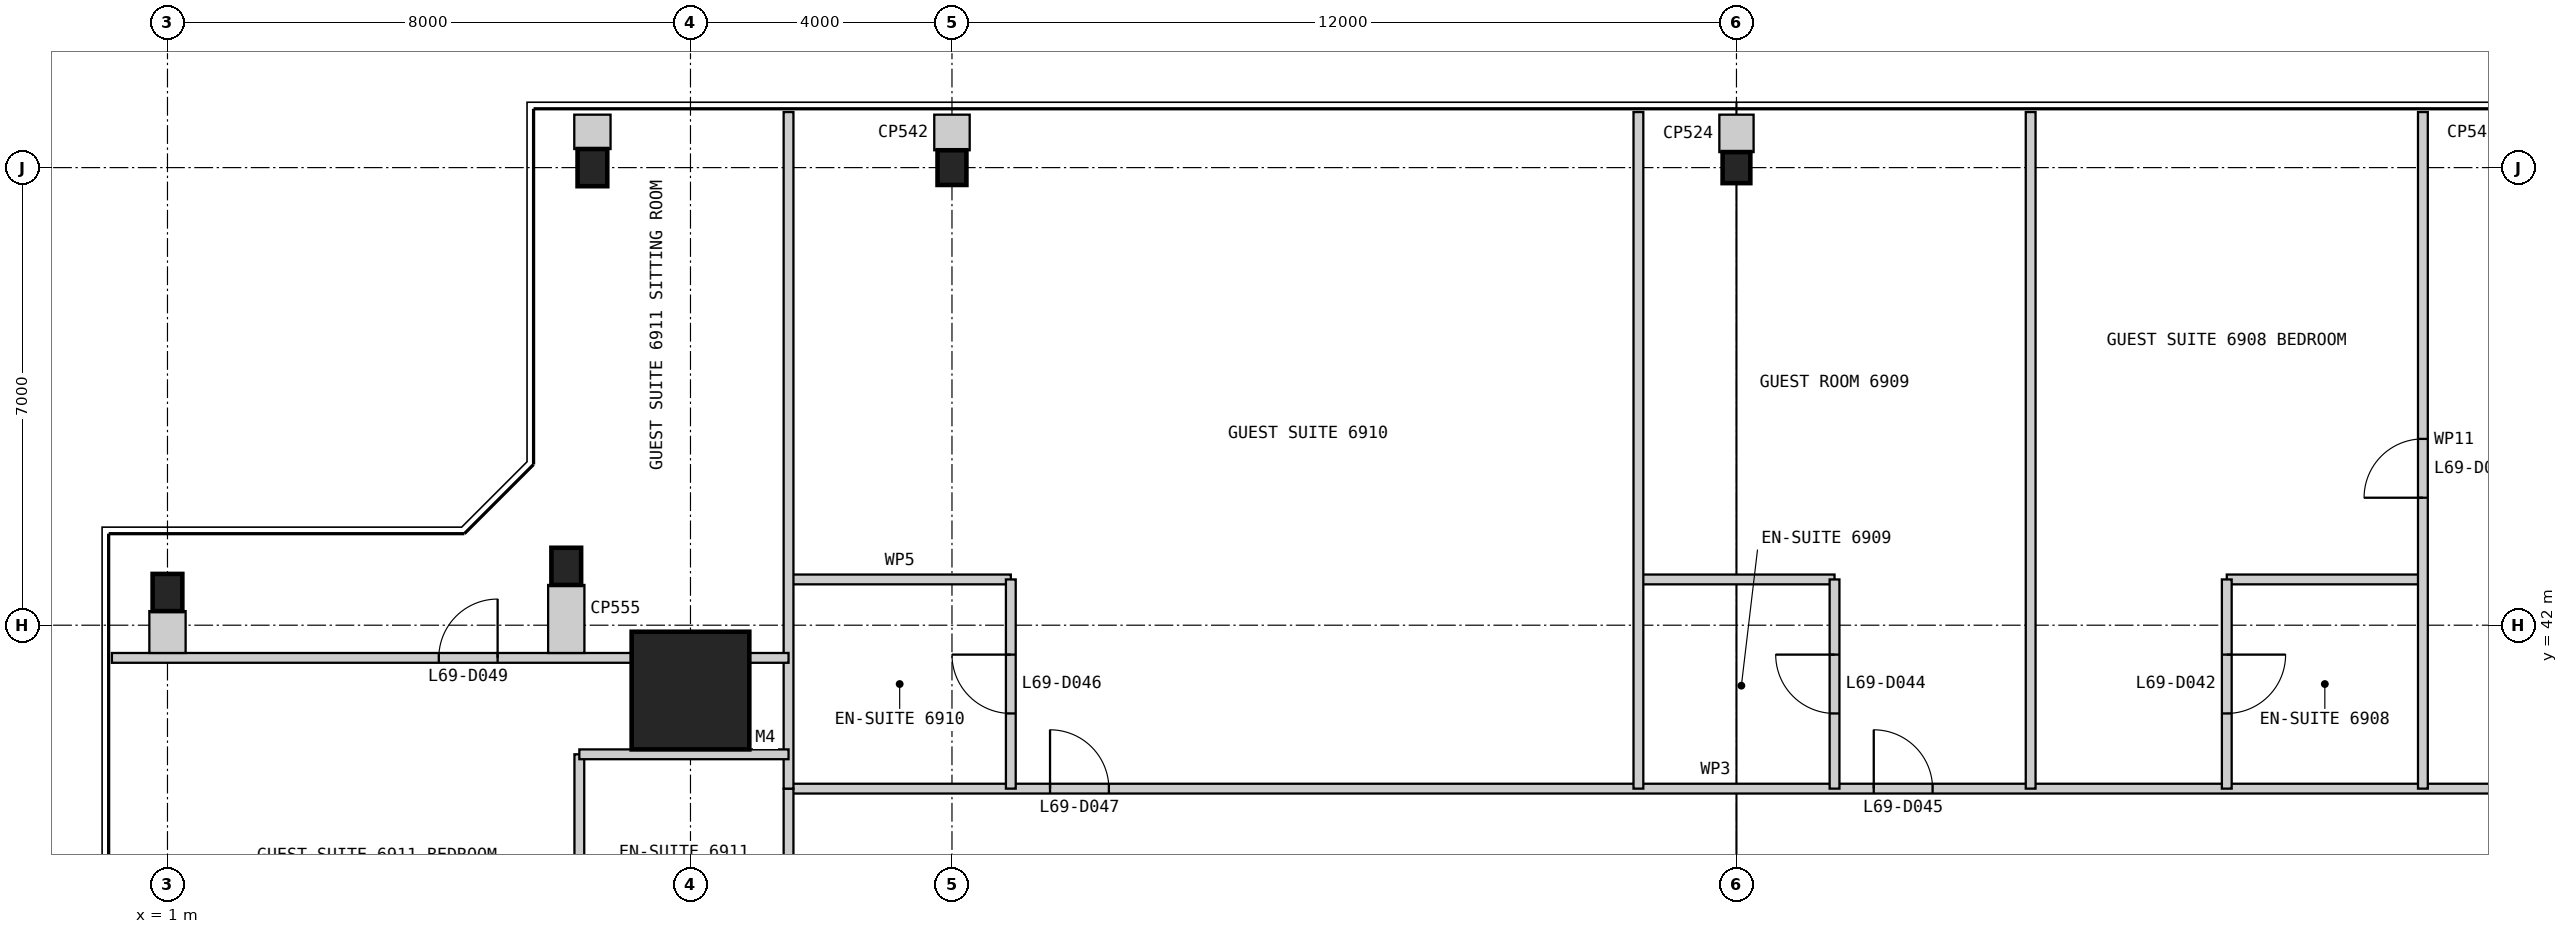
"""IFC4 building model, lengths in metres.
Left out: names, types, materials, properties, quantities, classifications, styles, units other than length and angle.
Written with IfcOpenShell. Run it as: python <this file> out.ifc"""

import sys

from ifc_helpers import new_model, si_unit, direction, frame, frame_2d, origin, origin_2d, place, context, subcontext, project, spatial, rectangle, i_section, extrude, element, fill, save


model = new_model("IFC4")
c1 = context("Model", 3, precision=1e-05, world=origin(), true_north=direction((0.0, 1.0)))
c2 = subcontext(c1, "Body", "Model", "MODEL_VIEW")
j1 = project(units=[si_unit("LENGTHUNIT", "METRE"), si_unit("PLANEANGLEUNIT", "RADIAN")], contexts=[c1])
p1 = place(None, origin())
s1 = spatial("IfcSite", under=j1, at=p1, CompositionType="ELEMENT")
p2 = place(p1, origin())
s2 = spatial("IfcBuilding", under=s1, at=p2, CompositionType="ELEMENT")
p3 = place(p2, frame((0.0, 0.0, 286.6)))
s3 = spatial("IfcBuildingStorey", under=s2, at=p3, CompositionType="ELEMENT", Elevation=286.6)
p4 = place(p3, frame((9.0, 41.0, 0.0), z_axis=(0.0, 0.0, 1.0), x_axis=(1.0, 0.0, 0.0)))
e1 = element("IfcColumn", 1, at=p4, inside=s3, PredefinedType="COLUMN", context=c2, shape_type="SweptSolid", body=[
    extrude(rectangle(XDim=1.8, YDim=1.8, at=origin_2d()), origin(), (0.0, 0.0, 1.0), 3.4),
])
p5 = place(p3, frame((25.0, 49.0, 0.0), z_axis=(0.0, 0.0, 1.0), x_axis=(1.0, 0.0, 0.0)))
e2 = element("IfcColumn", 2, at=p5, inside=s3, PredefinedType="COLUMN", context=c2, shape_type="SweptSolid", body=[
    extrude(i_section(OverallWidth=0.424, OverallDepth=0.475, WebThickness=0.048, FlangeThickness=0.077, at=origin_2d()), origin(), (0.0, 0.0, 1.0), 3.4),
])
p6 = place(p3, frame((13.0, 49.0, 0.0), z_axis=(0.0, 0.0, 1.0), x_axis=(1.0, 0.0, 0.0)))
e3 = element("IfcColumn", 3, at=p6, inside=s3, PredefinedType="COLUMN", context=c2, shape_type="SweptSolid", body=[
    extrude(i_section(OverallWidth=0.442, OverallDepth=0.531, WebThickness=0.066, FlangeThickness=0.106, at=origin_2d()), origin(), (0.0, 0.0, 1.0), 3.4),
])
for number, where, z_axis, x_axis in (
    (4, (7.5, 49.0, 0.0), (0.0, 0.0, 1.0), (1.0, 0.0, 0.0)),
    (5, (7.1, 42.9, 0.0), (0.0, 0.0, 1.0), (1.0, 0.0, 0.0)),
    (6, (1.0, 42.5, 0.0), (0.0, 0.0, 1.0), (1.0, 0.0, 0.0)),
):
    element("IfcColumn", number, at=place(p3, frame(where, z_axis=z_axis, x_axis=x_axis)), inside=s3, PredefinedType="COLUMN", context=c2, shape_type="SweptSolid", body=[
        extrude(i_section(OverallWidth=0.455, OverallDepth=0.569, WebThickness=0.078, FlangeThickness=0.125, at=origin_2d()), origin(), (0.0, 0.0, 1.0), 3.4),
    ])
p7 = place(p3, frame((39.5, 39.5, 0.0), z_axis=(0.0, 0.0, 1.0), x_axis=(-1.0, 0.0, 0.0)))
e7 = element("IfcWall", 7, at=p7, inside=s3, PredefinedType="PARTITIONING", context=c2, shape_type="SweptSolid", body=[
    extrude(rectangle(XDim=29.0, YDim=0.15, at=frame_2d((14.5, 0.0))), origin(), (0.0, 0.0, 1.0), 3.25),
])
p8 = place(p7, frame((1.85, 0.0, 0.0)))
e8 = element("IfcOpeningElement", 8, at=p8, cuts=e7, PredefinedType="OPENING", context=c2, shape_type="SweptSolid", body=[
    extrude(rectangle(XDim=0.9, YDim=2.1, at=frame_2d((0.45, 1.05))), frame((0.0, 0.085, 0.0), z_axis=(0.0, -1.0, 0.0), x_axis=(1.0, 0.0, 0.0)), (0.0, 0.0, 1.0), 0.17),
])
p9 = place(p7, frame((11.5, 0.0, 0.0)))
e9 = element("IfcOpeningElement", 9, at=p9, cuts=e7, PredefinedType="OPENING", context=c2, shape_type="SweptSolid", body=[
    extrude(rectangle(XDim=0.9, YDim=2.1, at=frame_2d((0.45, 1.05))), frame((0.0, 0.085, 0.0), z_axis=(0.0, -1.0, 0.0), x_axis=(1.0, 0.0, 0.0)), (0.0, 0.0, 1.0), 0.17),
])
p10 = place(p7, frame((24.1, 0.0, 0.0)))
e10 = element("IfcOpeningElement", 10, at=p10, cuts=e7, PredefinedType="OPENING", context=c2, shape_type="SweptSolid", body=[
    extrude(rectangle(XDim=0.9, YDim=2.1, at=frame_2d((0.45, 1.05))), frame((0.0, 0.085, 0.0), z_axis=(0.0, -1.0, 0.0), x_axis=(1.0, 0.0, 0.0)), (0.0, 0.0, 1.0), 0.17),
])
p11 = place(p3, frame((35.5, 42.7, 0.0), z_axis=(0.0, 0.0, 1.0), x_axis=(-1.0, 0.0, 0.0)))
e11 = element("IfcWall", 11, at=p11, inside=s3, PredefinedType="PARTITIONING", context=c2, shape_type="SweptSolid", body=[
    extrude(rectangle(XDim=3.0, YDim=0.15, at=frame_2d((1.5, 0.0))), origin(), (0.0, 0.0, 1.0), 3.25),
])
p12 = place(p3, frame((32.5, 42.7, 0.0), z_axis=(0.0, 0.0, 1.0), x_axis=(0.0, -1.0, 0.0)))
e12 = element("IfcWall", 12, at=p12, inside=s3, PredefinedType="PARTITIONING", context=c2, shape_type="SweptSolid", body=[
    extrude(rectangle(XDim=3.2, YDim=0.15, at=frame_2d((1.6, 0.0))), origin(), (0.0, 0.0, 1.0), 3.25),
])
p13 = place(p12, frame((1.15, 0.0, 0.0)))
e13 = element("IfcOpeningElement", 13, at=p13, cuts=e12, PredefinedType="OPENING", context=c2, shape_type="SweptSolid", body=[
    extrude(rectangle(XDim=0.9, YDim=2.1, at=frame_2d((0.45, 1.05))), frame((0.0, 0.085, 0.0), z_axis=(0.0, -1.0, 0.0), x_axis=(1.0, 0.0, 0.0)), (0.0, 0.0, 1.0), 0.17),
])
p14 = place(p3, frame((35.5, 49.85, 0.0), z_axis=(0.0, 0.0, 1.0), x_axis=(0.0, -1.0, 0.0)))
e14 = element("IfcWall", 14, at=p14, inside=s3, PredefinedType="PARTITIONING", context=c2, shape_type="SweptSolid", body=[
    extrude(rectangle(XDim=10.35, YDim=0.15, at=frame_2d((5.175, 0.0))), origin(), (0.0, 0.0, 1.0), 3.25),
])
p15 = place(p14, frame((5.0, 0.0, 0.0)))
e15 = element("IfcOpeningElement", 15, at=p15, cuts=e14, PredefinedType="OPENING", context=c2, shape_type="SweptSolid", body=[
    extrude(rectangle(XDim=0.9, YDim=2.1, at=frame_2d((0.45, 1.05))), frame((0.0, 0.085, 0.0), z_axis=(0.0, -1.0, 0.0), x_axis=(1.0, 0.0, 0.0)), (0.0, 0.0, 1.0), 0.17),
])
p16 = place(p3, frame((29.5, 49.85, 0.0), z_axis=(0.0, 0.0, 1.0), x_axis=(0.0, -1.0, 0.0)))
e16 = element("IfcWall", 16, at=p16, inside=s3, PredefinedType="PARTITIONING", context=c2, shape_type="SweptSolid", body=[
    extrude(rectangle(XDim=10.35, YDim=0.15, at=frame_2d((5.175, 0.0))), origin(), (0.0, 0.0, 1.0), 3.25),
])
p17 = place(p3, frame((26.5, 42.7, 0.0), z_axis=(0.0, 0.0, 1.0), x_axis=(-1.0, 0.0, 0.0)))
e17 = element("IfcWall", 17, at=p17, inside=s3, PredefinedType="PARTITIONING", context=c2, shape_type="SweptSolid", body=[
    extrude(rectangle(XDim=3.0, YDim=0.15, at=frame_2d((1.5, 0.0))), origin(), (0.0, 0.0, 1.0), 3.25),
])
p18 = place(p3, frame((26.5, 42.7, 0.0), z_axis=(0.0, 0.0, 1.0), x_axis=(0.0, -1.0, 0.0)))
e18 = element("IfcWall", 18, at=p18, inside=s3, PredefinedType="PARTITIONING", context=c2, shape_type="SweptSolid", body=[
    extrude(rectangle(XDim=3.2, YDim=0.15, at=frame_2d((1.6, 0.0))), origin(), (0.0, 0.0, 1.0), 3.25),
])
p19 = place(p18, frame((1.15, 0.0, 0.0)))
e19 = element("IfcOpeningElement", 19, at=p19, cuts=e18, PredefinedType="OPENING", context=c2, shape_type="SweptSolid", body=[
    extrude(rectangle(XDim=0.9, YDim=2.1, at=frame_2d((0.45, 1.05))), frame((0.0, 0.085, 0.0), z_axis=(0.0, -1.0, 0.0), x_axis=(1.0, 0.0, 0.0)), (0.0, 0.0, 1.0), 0.17),
])
p20 = place(p3, frame((23.5, 49.85, 0.0), z_axis=(0.0, 0.0, 1.0), x_axis=(0.0, -1.0, 0.0)))
e20 = element("IfcWall", 20, at=p20, inside=s3, PredefinedType="PARTITIONING", context=c2, shape_type="SweptSolid", body=[
    extrude(rectangle(XDim=10.35, YDim=0.15, at=frame_2d((5.175, 0.0))), origin(), (0.0, 0.0, 1.0), 3.25),
])
p21 = place(p3, frame((13.9, 42.7, 0.0), z_axis=(0.0, 0.0, 1.0), x_axis=(-1.0, 0.0, 0.0)))
e21 = element("IfcWall", 21, at=p21, inside=s3, PredefinedType="PARTITIONING", context=c2, shape_type="SweptSolid", body=[
    extrude(rectangle(XDim=3.4, YDim=0.15, at=frame_2d((1.7, 0.0))), origin(), (0.0, 0.0, 1.0), 3.25),
])
p22 = place(p3, frame((13.9, 42.7, 0.0), z_axis=(0.0, 0.0, 1.0), x_axis=(0.0, -1.0, 0.0)))
e22 = element("IfcWall", 22, at=p22, inside=s3, PredefinedType="PARTITIONING", context=c2, shape_type="SweptSolid", body=[
    extrude(rectangle(XDim=3.2, YDim=0.15, at=frame_2d((1.6, 0.0))), origin(), (0.0, 0.0, 1.0), 3.25),
])
p23 = place(p22, frame((1.15, 0.0, 0.0)))
e23 = element("IfcOpeningElement", 23, at=p23, cuts=e22, PredefinedType="OPENING", context=c2, shape_type="SweptSolid", body=[
    extrude(rectangle(XDim=0.9, YDim=2.1, at=frame_2d((0.45, 1.05))), frame((0.0, 0.085, 0.0), z_axis=(0.0, -1.0, 0.0), x_axis=(1.0, 0.0, 0.0)), (0.0, 0.0, 1.0), 0.17),
])
p24 = place(p3, frame((10.5, 39.5, 0.0), z_axis=(0.0, 0.0, 1.0), x_axis=(0.0, -1.0, 0.0)))
e24 = element("IfcWall", 24, at=p24, inside=s3, PredefinedType="PARTITIONING", context=c2, shape_type="SweptSolid", body=[
    extrude(rectangle(XDim=29.0, YDim=0.15, at=frame_2d((14.5, 0.0))), origin(), (0.0, 0.0, 1.0), 3.25),
])
p25 = place(p24, frame((2.775, 0.0, 0.0)))
e25 = element("IfcOpeningElement", 25, at=p25, cuts=e24, PredefinedType="OPENING", context=c2, shape_type="SweptSolid", body=[
    extrude(rectangle(XDim=0.9, YDim=2.1, at=frame_2d((0.45, 1.05))), frame((0.0, 0.085, 0.0), z_axis=(0.0, -1.0, 0.0), x_axis=(1.0, 0.0, 0.0)), (0.0, 0.0, 1.0), 0.17),
])
p26 = place(p24, frame((11.1, 0.0, 0.0)))
e26 = element("IfcOpeningElement", 26, at=p26, cuts=e24, PredefinedType="OPENING", context=c2, shape_type="SweptSolid", body=[
    extrude(rectangle(XDim=0.9, YDim=2.1, at=frame_2d((0.45, 1.05))), frame((0.0, 0.085, 0.0), z_axis=(0.0, -1.0, 0.0), x_axis=(1.0, 0.0, 0.0)), (0.0, 0.0, 1.0), 0.17),
])
p27 = place(p24, frame((17.5, 0.0, 0.0)))
e27 = element("IfcOpeningElement", 27, at=p27, cuts=e24, PredefinedType="OPENING", context=c2, shape_type="SweptSolid", body=[
    extrude(rectangle(XDim=0.9, YDim=2.1, at=frame_2d((0.45, 1.05))), frame((0.0, 0.085, 0.0), z_axis=(0.0, -1.0, 0.0), x_axis=(1.0, 0.0, 0.0)), (0.0, 0.0, 1.0), 0.17),
])
p28 = place(p24, frame((24.5, 0.0, 0.0)))
e28 = element("IfcOpeningElement", 28, at=p28, cuts=e24, PredefinedType="OPENING", context=c2, shape_type="SweptSolid", body=[
    extrude(rectangle(XDim=0.9, YDim=2.1, at=frame_2d((0.45, 1.05))), frame((0.0, 0.085, 0.0), z_axis=(0.0, -1.0, 0.0), x_axis=(1.0, 0.0, 0.0)), (0.0, 0.0, 1.0), 0.17),
])
p29 = place(p3, frame((10.5, 49.85, 0.0), z_axis=(0.0, 0.0, 1.0), x_axis=(0.0, -1.0, 0.0)))
e29 = element("IfcWall", 29, at=p29, inside=s3, PredefinedType="PARTITIONING", context=c2, shape_type="SweptSolid", body=[
    extrude(rectangle(XDim=10.35, YDim=0.15, at=frame_2d((5.175, 0.0))), origin(), (0.0, 0.0, 1.0), 3.25),
])
p30 = place(p3, frame((7.3, 40.025, 0.0), z_axis=(0.0, 0.0, 1.0), x_axis=(0.0, -1.0, 0.0)))
e30 = element("IfcWall", 30, at=p30, inside=s3, PredefinedType="PARTITIONING", context=c2, shape_type="SweptSolid", body=[
    extrude(rectangle(XDim=3.0, YDim=0.15, at=frame_2d((1.5, 0.0))), origin(), (0.0, 0.0, 1.0), 3.25),
])
p31 = place(p3, frame((7.3, 40.025, 0.0), z_axis=(0.0, 0.0, 1.0), x_axis=(1.0, 0.0, 0.0)))
e31 = element("IfcWall", 31, at=p31, inside=s3, PredefinedType="PARTITIONING", context=c2, shape_type="SweptSolid", body=[
    extrude(rectangle(XDim=3.2, YDim=0.15, at=frame_2d((1.6, 0.0))), origin(), (0.0, 0.0, 1.0), 3.25),
])
p32 = place(p3, frame((0.15, 41.5, 0.0), z_axis=(0.0, 0.0, 1.0), x_axis=(1.0, 0.0, 0.0)))
e32 = element("IfcWall", 32, at=p32, inside=s3, PredefinedType="PARTITIONING", context=c2, shape_type="SweptSolid", body=[
    extrude(rectangle(XDim=10.35, YDim=0.15, at=frame_2d((5.175, 0.0))), origin(), (0.0, 0.0, 1.0), 3.25),
])
p33 = place(p32, frame((5.0, 0.0, 0.0)))
e33 = element("IfcOpeningElement", 33, at=p33, cuts=e32, PredefinedType="OPENING", context=c2, shape_type="SweptSolid", body=[
    extrude(rectangle(XDim=0.9, YDim=2.1, at=frame_2d((0.45, 1.05))), frame((0.0, 0.085, 0.0), z_axis=(0.0, -1.0, 0.0), x_axis=(1.0, 0.0, 0.0)), (0.0, 0.0, 1.0), 0.17),
])
p34 = place(p3, frame((25.0, 49.81, 0.0), z_axis=(0.0, 0.0, 1.0), x_axis=(0.0, -1.0, 0.0)))
e34 = element("IfcWall", 34, at=p34, inside=s3, PredefinedType="PARTITIONING", context=c2, shape_type="SweptSolid", body=[
    extrude(rectangle(XDim=0.573, YDim=0.524, at=frame_2d((0.286, 0.0))), origin(), (0.0, 0.0, 1.0), 3.25),
])
p35 = place(p3, frame((13.0, 49.81, 0.0), z_axis=(0.0, 0.0, 1.0), x_axis=(0.0, -1.0, 0.0)))
e35 = element("IfcWall", 35, at=p35, inside=s3, PredefinedType="PARTITIONING", context=c2, shape_type="SweptSolid", body=[
    extrude(rectangle(XDim=0.545, YDim=0.542, at=frame_2d((0.272, 0.0))), origin(), (0.0, 0.0, 1.0), 3.25),
])
p36 = place(p3, frame((7.5, 49.81, 0.0), z_axis=(0.0, 0.0, 1.0), x_axis=(0.0, -1.0, 0.0)))
e36 = element("IfcWall", 36, at=p36, inside=s3, PredefinedType="PARTITIONING", context=c2, shape_type="SweptSolid", body=[
    extrude(rectangle(XDim=0.526, YDim=0.555, at=frame_2d((0.263, 0.0))), origin(), (0.0, 0.0, 1.0), 3.25),
])
p37 = place(p3, frame((7.1, 41.575, 0.0), z_axis=(0.0, 0.0, 1.0), x_axis=(0.0, 1.0, 0.0)))
e37 = element("IfcWall", 37, at=p37, inside=s3, PredefinedType="PARTITIONING", context=c2, shape_type="SweptSolid", body=[
    extrude(rectangle(XDim=1.041, YDim=0.555, at=frame_2d((0.52, 0.0))), origin(), (0.0, 0.0, 1.0), 3.25),
])
p38 = place(p3, frame((1.0, 41.575, 0.0), z_axis=(0.0, 0.0, 1.0), x_axis=(0.0, 1.0, 0.0)))
e38 = element("IfcWall", 38, at=p38, inside=s3, PredefinedType="PARTITIONING", context=c2, shape_type="SweptSolid", body=[
    extrude(rectangle(XDim=0.641, YDim=0.555, at=frame_2d((0.32, 0.0))), origin(), (0.0, 0.0, 1.0), 2.338),
])
p39 = place(p13, origin())
e39 = element("IfcDoor", 39, at=p39, inside=s3, OperationType="SINGLE_SWING_LEFT", PredefinedType="DOOR", context=c2, shape_type="SweptSolid", body=[
    extrude(rectangle(XDim=0.9, YDim=2.1, at=frame_2d((0.45, 1.05))), frame((0.0, 0.025, 0.0), z_axis=(0.0, -1.0, 0.0), x_axis=(1.0, 0.0, 0.0)), (0.0, 0.0, 1.0), 0.05),
])
fill(e13, e39)
p40 = place(p15, frame((0.9, 0.0, 0.0), z_axis=(0.0, 0.0, 1.0), x_axis=(-1.0, 0.0, 0.0)))
e40 = element("IfcDoor", 40, at=p40, inside=s3, OperationType="SINGLE_SWING_LEFT", PredefinedType="DOOR", context=c2, shape_type="SweptSolid", body=[
    extrude(rectangle(XDim=0.9, YDim=2.1, at=frame_2d((0.45, 1.05))), frame((0.0, 0.025, 0.0), z_axis=(0.0, -1.0, 0.0), x_axis=(1.0, 0.0, 0.0)), (0.0, 0.0, 1.0), 0.05),
])
fill(e15, e40)
p41 = place(p19, frame((0.9, 0.0, 0.0), z_axis=(0.0, 0.0, 1.0), x_axis=(-1.0, 0.0, 0.0)))
e41 = element("IfcDoor", 41, at=p41, inside=s3, OperationType="SINGLE_SWING_RIGHT", PredefinedType="DOOR", context=c2, shape_type="SweptSolid", body=[
    extrude(rectangle(XDim=0.9, YDim=2.1, at=frame_2d((0.45, 1.05))), frame((0.0, 0.025, 0.0), z_axis=(0.0, -1.0, 0.0), x_axis=(1.0, 0.0, 0.0)), (0.0, 0.0, 1.0), 0.05),
])
fill(e19, e41)
p42 = place(p9, frame((0.9, 0.0, 0.0), z_axis=(0.0, 0.0, 1.0), x_axis=(-1.0, 0.0, 0.0)))
e42 = element("IfcDoor", 42, at=p42, inside=s3, OperationType="SINGLE_SWING_LEFT", PredefinedType="DOOR", context=c2, shape_type="SweptSolid", body=[
    extrude(rectangle(XDim=0.9, YDim=2.1, at=frame_2d((0.45, 1.05))), frame((0.0, 0.025, 0.0), z_axis=(0.0, -1.0, 0.0), x_axis=(1.0, 0.0, 0.0)), (0.0, 0.0, 1.0), 0.05),
])
fill(e9, e42)
p43 = place(p23, frame((0.9, 0.0, 0.0), z_axis=(0.0, 0.0, 1.0), x_axis=(-1.0, 0.0, 0.0)))
e43 = element("IfcDoor", 43, at=p43, inside=s3, OperationType="SINGLE_SWING_RIGHT", PredefinedType="DOOR", context=c2, shape_type="SweptSolid", body=[
    extrude(rectangle(XDim=0.9, YDim=2.1, at=frame_2d((0.45, 1.05))), frame((0.0, 0.025, 0.0), z_axis=(0.0, -1.0, 0.0), x_axis=(1.0, 0.0, 0.0)), (0.0, 0.0, 1.0), 0.05),
])
fill(e23, e43)
p44 = place(p10, frame((0.9, 0.0, 0.0), z_axis=(0.0, 0.0, 1.0), x_axis=(-1.0, 0.0, 0.0)))
e44 = element("IfcDoor", 44, at=p44, inside=s3, OperationType="SINGLE_SWING_LEFT", PredefinedType="DOOR", context=c2, shape_type="SweptSolid", body=[
    extrude(rectangle(XDim=0.9, YDim=2.1, at=frame_2d((0.45, 1.05))), frame((0.0, 0.025, 0.0), z_axis=(0.0, -1.0, 0.0), x_axis=(1.0, 0.0, 0.0)), (0.0, 0.0, 1.0), 0.05),
])
fill(e10, e44)
p45 = place(p33, origin())
e45 = element("IfcDoor", 45, at=p45, inside=s3, OperationType="SINGLE_SWING_RIGHT", PredefinedType="DOOR", context=c2, shape_type="SweptSolid", body=[
    extrude(rectangle(XDim=0.9, YDim=2.1, at=frame_2d((0.45, 1.05))), frame((0.0, 0.025, 0.0), z_axis=(0.0, -1.0, 0.0), x_axis=(1.0, 0.0, 0.0)), (0.0, 0.0, 1.0), 0.05),
])
fill(e33, e45)
save(model, sys.argv[1])
